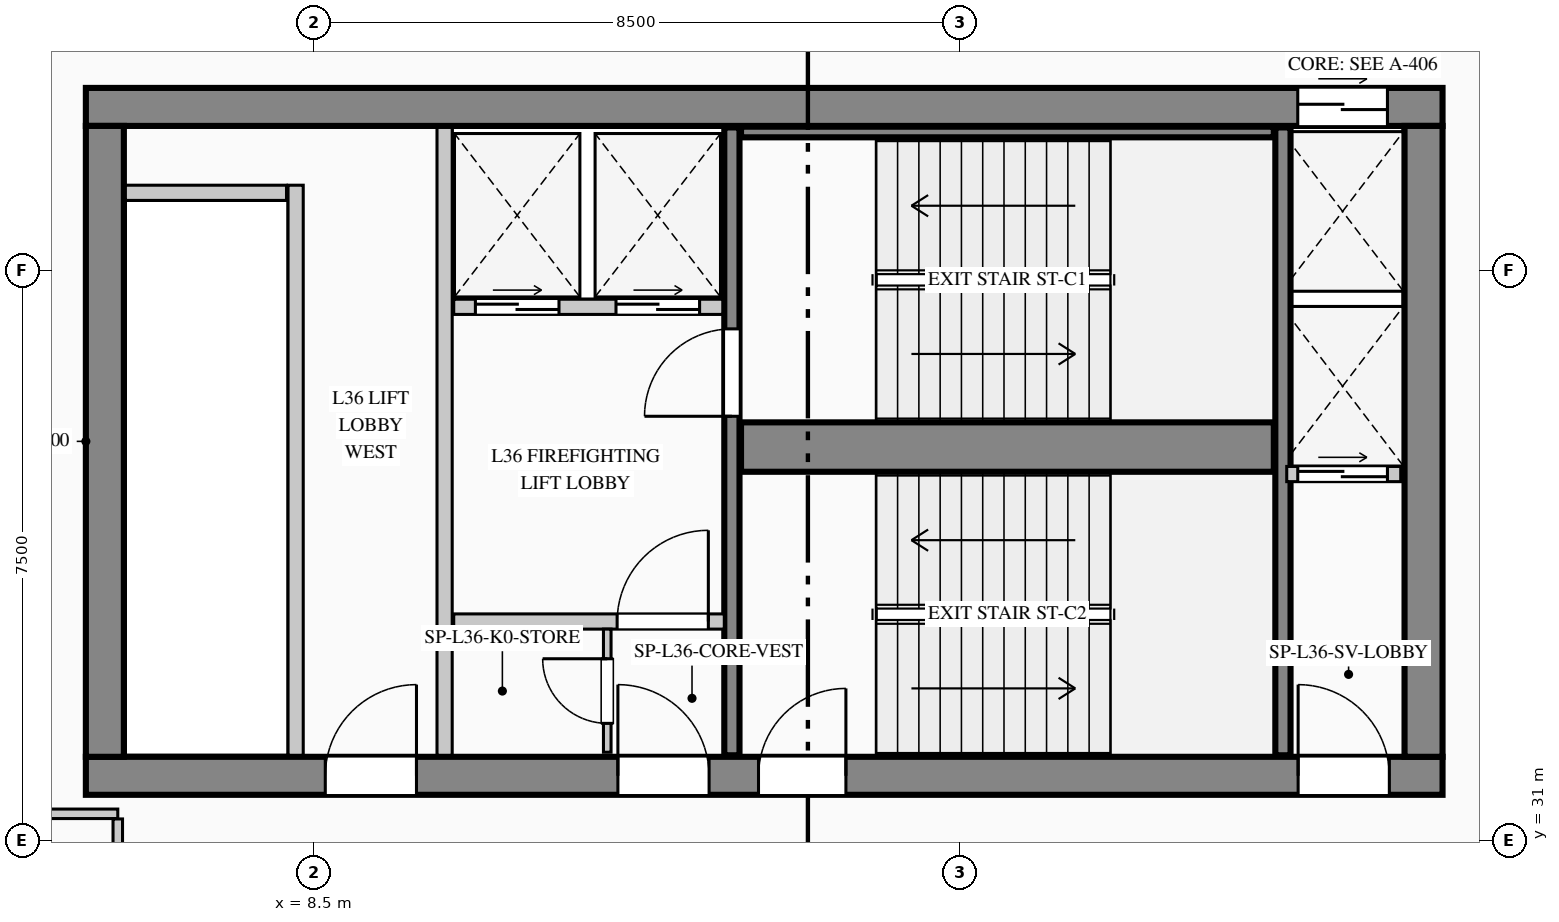
"""IFC4 building model, lengths in metres.
Left out: names, types, materials, properties, quantities, classifications, styles, units other than length and angle.
Written with IfcOpenShell. Run it as: python <this file> out.ifc"""

import sys

from ifc_helpers import new_model, si_unit, direction, frame, frame_2d, origin, place, context, subcontext, project, spatial, rectangle, extrude, element, fill, save


model = new_model("IFC4")
c1 = context("Model", 3, precision=1e-05, world=origin(), true_north=direction((0.0, 1.0)))
c2 = subcontext(c1, "Body", "Model", "MODEL_VIEW")
j1 = project(units=[si_unit("LENGTHUNIT", "METRE"), si_unit("PLANEANGLEUNIT", "RADIAN")], contexts=[c1])
p1 = place(None, origin())
s1 = spatial("IfcSite", under=j1, at=p1, CompositionType="ELEMENT")
p2 = place(p1, origin())
s2 = spatial("IfcBuilding", under=s1, at=p2, CompositionType="ELEMENT")
p3 = place(p2, frame((0.0, 0.0, 154.85)))
s3 = spatial("IfcBuildingStorey", under=s2, at=p3, CompositionType="ELEMENT", Elevation=154.85)
p4 = place(p3, frame((5.5, 40.65, 0.0), z_axis=(0.0, 0.0, 1.0), x_axis=(1.0, 0.0, 0.0)))
e1 = element("IfcWall", 1, at=p4, inside=s3, PredefinedType="SHEAR", context=c2, shape_type="SweptSolid", body=[
    extrude(rectangle(XDim=17.85, YDim=0.5, at=frame_2d((8.925, 0.0))), origin(), (0.0, 0.0, 1.0), 3.95),
])
p5 = place(p4, frame((15.945, 0.0, 0.0)))
e2 = element("IfcOpeningElement", 2, at=p5, cuts=e1, PredefinedType="OPENING", context=c2, shape_type="SweptSolid", body=[
    extrude(rectangle(XDim=1.18, YDim=2.25, at=frame_2d((0.59, 1.125))), frame((0.0, 0.26, 0.0), z_axis=(0.0, -1.0, 0.0), x_axis=(1.0, 0.0, 0.0)), (0.0, 0.0, 1.0), 0.52),
])
p6 = place(p3, frame((5.5, 31.85, 0.0), z_axis=(0.0, 0.0, 1.0), x_axis=(1.0, 0.0, 0.0)))
e3 = element("IfcWall", 3, at=p6, inside=s3, PredefinedType="SHEAR", context=c2, shape_type="SweptSolid", body=[
    extrude(rectangle(XDim=17.85, YDim=0.5, at=frame_2d((8.925, 0.0))), origin(), (0.0, 0.0, 1.0), 3.95),
])
p7 = place(p6, frame((3.15, 0.0, 0.0)))
e4 = element("IfcOpeningElement", 4, at=p7, cuts=e3, PredefinedType="OPENING", context=c2, shape_type="SweptSolid", body=[
    extrude(rectangle(XDim=1.2, YDim=2.2, at=frame_2d((0.6, 1.1))), frame((0.0, 0.26, 0.0), z_axis=(0.0, -1.0, 0.0), x_axis=(1.0, 0.0, 0.0)), (0.0, 0.0, 1.0), 0.52),
])
p8 = place(p6, frame((7.0, 0.0, 0.0)))
e5 = element("IfcOpeningElement", 5, at=p8, cuts=e3, PredefinedType="OPENING", context=c2, shape_type="SweptSolid", body=[
    extrude(rectangle(XDim=1.2, YDim=2.2, at=frame_2d((0.6, 1.1))), frame((0.0, 0.26, 0.0), z_axis=(0.0, -1.0, 0.0), x_axis=(1.0, 0.0, 0.0)), (0.0, 0.0, 1.0), 0.52),
])
p9 = place(p6, frame((8.85, 0.0, 0.0)))
e6 = element("IfcOpeningElement", 6, at=p9, cuts=e3, PredefinedType="OPENING", context=c2, shape_type="SweptSolid", body=[
    extrude(rectangle(XDim=1.15, YDim=2.2, at=frame_2d((0.575, 1.1))), frame((0.0, 0.26, 0.0), z_axis=(0.0, -1.0, 0.0), x_axis=(1.0, 0.0, 0.0)), (0.0, 0.0, 1.0), 0.52),
])
p10 = place(p6, frame((15.95, 0.0, 0.0)))
e7 = element("IfcOpeningElement", 7, at=p10, cuts=e3, PredefinedType="OPENING", context=c2, shape_type="SweptSolid", body=[
    extrude(rectangle(XDim=1.2, YDim=2.2, at=frame_2d((0.6, 1.1))), frame((0.0, 0.26, 0.0), z_axis=(0.0, -1.0, 0.0), x_axis=(1.0, 0.0, 0.0)), (0.0, 0.0, 1.0), 0.52),
])
for number, where, z_axis, x_axis in (
    (8, (5.75, 32.1, 0.0), (0.0, 0.0, 1.0), (0.0, 1.0, 0.0)),
    (9, (23.1, 32.1, 0.0), (0.0, 0.0, 1.0), (0.0, 1.0, 0.0)),
):
    element("IfcWall", number, at=place(p3, frame(where, z_axis=z_axis, x_axis=x_axis)), inside=s3, PredefinedType="SHEAR", context=c2, shape_type="SweptSolid", body=[
        extrude(rectangle(XDim=8.3, YDim=0.5, at=frame_2d((4.15, 0.0))), origin(), (0.0, 0.0, 1.0), 3.95),
    ])
p11 = place(p3, frame((14.0, 32.12, 0.0), z_axis=(0.0, 0.0, 1.0), x_axis=(0.0, 1.0, 0.0)))
e10 = element("IfcWall", 10, at=p11, inside=s3, PredefinedType="SHEAR", context=c2, shape_type="SweptSolid", body=[
    extrude(rectangle(XDim=8.26, YDim=0.2, at=frame_2d((4.13, 0.0))), origin(), (0.0, 0.0, 1.0), 3.95),
])
p12 = place(p11, frame((4.46, 0.0, 0.0)))
e11 = element("IfcOpeningElement", 11, at=p12, cuts=e10, PredefinedType="OPENING", context=c2, shape_type="SweptSolid", body=[
    extrude(rectangle(XDim=1.15, YDim=2.2, at=frame_2d((0.575, 1.1))), frame((0.0, 0.11, 0.0), z_axis=(0.0, -1.0, 0.0), x_axis=(1.0, 0.0, 0.0)), (0.0, 0.0, 1.0), 0.22),
])
p13 = place(p3, frame((14.12, 36.175, 0.0), z_axis=(0.0, 0.0, 1.0), x_axis=(1.0, 0.0, 0.0)))
e12 = element("IfcWall", 12, at=p13, inside=s3, PredefinedType="SHEAR", context=c2, shape_type="SweptSolid", body=[
    extrude(rectangle(XDim=7.01, YDim=0.65, at=frame_2d((3.505, 0.0))), origin(), (0.0, 0.0, 1.0), 3.95),
])
p14 = place(p3, frame((21.25, 32.12, 0.0), z_axis=(0.0, 0.0, 1.0), x_axis=(0.0, 1.0, 0.0)))
e13 = element("IfcWall", 13, at=p14, inside=s3, PredefinedType="SHEAR", context=c2, shape_type="SweptSolid", body=[
    extrude(rectangle(XDim=8.26, YDim=0.2, at=frame_2d((4.13, 0.0))), origin(), (0.0, 0.0, 1.0), 3.95),
])
p15 = place(p3, frame((14.12, 40.32, 0.0), z_axis=(0.0, 0.0, 1.0), x_axis=(1.0, 0.0, 0.0)))
e14 = element("IfcWall", 14, at=p15, inside=s3, PredefinedType="SHEAR", context=c2, shape_type="SweptSolid", body=[
    extrude(rectangle(XDim=7.01, YDim=0.14, at=frame_2d((3.505, 0.0))), origin(), (0.0, 0.0, 1.0), 3.95),
])
p16 = place(p3, frame((7.993, 4.73, 0.0), z_axis=(0.0, 0.0, 1.0), x_axis=(-0.136989009016, 0.990572567462, 0.0)))
e15 = element("IfcWall", 15, at=p16, inside=s3, PredefinedType="STANDARD", context=c2, shape_type="SweptSolid", body=[
    extrude(rectangle(XDim=36.888, YDim=0.26, at=frame_2d((18.444, 0.0))), origin(), (0.0, 0.0, 1.0), 3.69),
])
p17 = place(p16, frame((19.435, 0.0, 0.9)))
e16 = element("IfcOpeningElement", 16, at=p17, cuts=e15, PredefinedType="OPENING", context=c2, shape_type="SweptSolid", body=[
    extrude(rectangle(XDim=2.1, YDim=2.0, at=frame_2d((1.05, 1.0))), frame((0.0, 0.14, 0.0), z_axis=(0.0, -1.0, 0.0), x_axis=(1.0, 0.0, 0.0)), (0.0, 0.0, 1.0), 0.28),
])
p18 = place(p3, frame((8.26, 32.12, 0.0), z_axis=(0.0, 0.0, 1.0), x_axis=(0.0, 1.0, 0.0)))
e17 = element("IfcWall", 17, at=p18, inside=s3, PredefinedType="PARTITIONING", context=c2, shape_type="SweptSolid", body=[
    extrude(rectangle(XDim=7.5, YDim=0.2, at=frame_2d((3.75, 0.0))), origin(), (0.0, 0.0, 1.0), 3.69),
])
p19 = place(p3, frame((6.02, 39.52, 0.0), z_axis=(0.0, 0.0, 1.0), x_axis=(1.0, 0.0, 0.0)))
e18 = element("IfcWall", 18, at=p19, inside=s3, PredefinedType="PARTITIONING", context=c2, shape_type="SweptSolid", body=[
    extrude(rectangle(XDim=2.12, YDim=0.2, at=frame_2d((1.06, 0.0))), origin(), (0.0, 0.0, 1.0), 3.69),
])
p20 = place(p3, frame((10.22, 32.12, 0.0), z_axis=(0.0, 0.0, 1.0), x_axis=(0.0, 1.0, 0.0)))
e19 = element("IfcWall", 19, at=p20, inside=s3, PredefinedType="PARTITIONING", context=c2, shape_type="SweptSolid", body=[
    extrude(rectangle(XDim=8.26, YDim=0.2, at=frame_2d((4.13, 0.0))), origin(), (0.0, 0.0, 1.0), 3.69),
])
p21 = place(p3, frame((10.34, 38.02, 0.0), z_axis=(0.0, 0.0, 1.0), x_axis=(1.0, 0.0, 0.0)))
e20 = element("IfcWall", 20, at=p21, inside=s3, PredefinedType="PARTITIONING", context=c2, shape_type="SweptSolid", body=[
    extrude(rectangle(XDim=3.54, YDim=0.2, at=frame_2d((1.77, 0.0))), origin(), (0.0, 0.0, 1.0), 3.69),
])
p22 = place(p21, frame((0.285, 0.0, 0.0)))
e21 = element("IfcOpeningElement", 21, at=p22, cuts=e20, PredefinedType="OPENING", context=c2, shape_type="SweptSolid", body=[
    extrude(rectangle(XDim=1.1, YDim=2.2, at=frame_2d((0.55, 1.1))), frame((0.0, 0.11, 0.0), z_axis=(0.0, -1.0, 0.0), x_axis=(1.0, 0.0, 0.0)), (0.0, 0.0, 1.0), 0.22),
])
p23 = place(p21, frame((2.135, 0.0, 0.0)))
e22 = element("IfcOpeningElement", 22, at=p23, cuts=e20, PredefinedType="OPENING", context=c2, shape_type="SweptSolid", body=[
    extrude(rectangle(XDim=1.1, YDim=2.2, at=frame_2d((0.55, 1.1))), frame((0.0, 0.11, 0.0), z_axis=(0.0, -1.0, 0.0), x_axis=(1.0, 0.0, 0.0)), (0.0, 0.0, 1.0), 0.22),
])
p24 = place(p3, frame((10.34, 33.88, 0.0), z_axis=(0.0, 0.0, 1.0), x_axis=(1.0, 0.0, 0.0)))
e23 = element("IfcWall", 23, at=p24, inside=s3, PredefinedType="PARTITIONING", context=c2, shape_type="SweptSolid", body=[
    extrude(rectangle(XDim=3.56, YDim=0.2, at=frame_2d((1.78, 0.0))), origin(), (0.0, 0.0, 1.0), 3.69),
])
p25 = place(p24, frame((2.15, 0.0, 0.0)))
e24 = element("IfcOpeningElement", 24, at=p25, cuts=e23, PredefinedType="OPENING", context=c2, shape_type="SweptSolid", body=[
    extrude(rectangle(XDim=1.2, YDim=2.2, at=frame_2d((0.6, 1.1))), frame((0.0, 0.11, 0.0), z_axis=(0.0, -1.0, 0.0), x_axis=(1.0, 0.0, 0.0)), (0.0, 0.0, 1.0), 0.22),
])
p26 = place(p3, frame((12.36, 32.16, 0.0), z_axis=(0.0, 0.0, 1.0), x_axis=(0.0, 1.0, 0.0)))
e25 = element("IfcWall", 25, at=p26, inside=s3, PredefinedType="PARTITIONING", context=c2, shape_type="SweptSolid", body=[
    extrude(rectangle(XDim=1.62, YDim=0.1, at=frame_2d((0.81, 0.0))), origin(), (0.0, 0.0, 1.0), 3.69),
])
p27 = place(p26, frame((0.38, 0.0, 0.0)))
e26 = element("IfcOpeningElement", 26, at=p27, cuts=e25, PredefinedType="OPENING", context=c2, shape_type="SweptSolid", body=[
    extrude(rectangle(XDim=0.85, YDim=2.1, at=frame_2d((0.425, 1.05))), frame((0.0, 0.06, 0.0), z_axis=(0.0, -1.0, 0.0), x_axis=(1.0, 0.0, 0.0)), (0.0, 0.0, 1.0), 0.12),
])
p28 = place(p3, frame((21.3, 35.82, 0.0), z_axis=(0.0, 0.0, 1.0), x_axis=(1.0, 0.0, 0.0)))
e27 = element("IfcWall", 27, at=p28, inside=s3, PredefinedType="PARTITIONING", context=c2, shape_type="SweptSolid", body=[
    extrude(rectangle(XDim=1.5, YDim=0.2, at=frame_2d((0.75, 0.0))), origin(), (0.0, 0.0, 1.0), 3.69),
])
p29 = place(p28, frame((0.145, 0.0, 0.0)))
e28 = element("IfcOpeningElement", 28, at=p29, cuts=e27, PredefinedType="OPENING", context=c2, shape_type="SweptSolid", body=[
    extrude(rectangle(XDim=1.18, YDim=2.25, at=frame_2d((0.59, 1.125))), frame((0.0, 0.11, 0.0), z_axis=(0.0, -1.0, 0.0), x_axis=(1.0, 0.0, 0.0)), (0.0, 0.0, 1.0), 0.22),
])
p30 = place(p3, frame((4.448, 31.35, 0.0), z_axis=(0.0, 0.0, 1.0), x_axis=(1.0, 0.0, 0.0)))
e29 = element("IfcWall", 29, at=p30, inside=s3, PredefinedType="PARTITIONING", context=c2, shape_type="SweptSolid", body=[
    extrude(rectangle(XDim=1.472, YDim=0.125, at=frame_2d((0.736, 0.0))), origin(), (0.0, 0.0, 1.0), 3.69),
])
p31 = place(p3, frame((5.92, 31.282, 0.0), z_axis=(0.0, 0.0, 1.0), x_axis=(0.0, -1.0, 0.0)))
e30 = element("IfcWall", 30, at=p31, inside=s3, PredefinedType="PARTITIONING", context=c2, shape_type="SweptSolid", body=[
    extrude(rectangle(XDim=2.682, YDim=0.125, at=frame_2d((1.341, 0.0))), origin(), (0.0, 0.0, 1.0), 3.69),
])
p32 = place(p7, origin())
e31 = element("IfcDoor", 31, at=p32, inside=s3, OperationType="SINGLE_SWING_RIGHT", PredefinedType="DOOR", context=c2, shape_type="SweptSolid", body=[
    extrude(rectangle(XDim=1.2, YDim=2.2, at=frame_2d((0.6, 1.1))), frame((0.0, 0.025, 0.0), z_axis=(0.0, -1.0, 0.0), x_axis=(1.0, 0.0, 0.0)), (0.0, 0.0, 1.0), 0.05),
])
fill(e4, e31)
p33 = place(p8, origin())
e32 = element("IfcDoor", 32, at=p33, inside=s3, OperationType="SINGLE_SWING_LEFT", PredefinedType="DOOR", context=c2, shape_type="SweptSolid", body=[
    extrude(rectangle(XDim=1.2, YDim=2.2, at=frame_2d((0.6, 1.1))), frame((0.0, 0.025, 0.0), z_axis=(0.0, -1.0, 0.0), x_axis=(1.0, 0.0, 0.0)), (0.0, 0.0, 1.0), 0.05),
])
fill(e5, e32)
p34 = place(p9, origin())
e33 = element("IfcDoor", 33, at=p34, inside=s3, OperationType="SINGLE_SWING_RIGHT", PredefinedType="DOOR", context=c2, shape_type="SweptSolid", body=[
    extrude(rectangle(XDim=1.15, YDim=2.2, at=frame_2d((0.575, 1.1))), frame((0.0, 0.025, 0.0), z_axis=(0.0, -1.0, 0.0), x_axis=(1.0, 0.0, 0.0)), (0.0, 0.0, 1.0), 0.05),
])
fill(e6, e33)
p35 = place(p10, origin())
e34 = element("IfcDoor", 34, at=p35, inside=s3, OperationType="SINGLE_SWING_LEFT", PredefinedType="DOOR", context=c2, shape_type="SweptSolid", body=[
    extrude(rectangle(XDim=1.2, YDim=2.2, at=frame_2d((0.6, 1.1))), frame((0.0, 0.025, 0.0), z_axis=(0.0, -1.0, 0.0), x_axis=(1.0, 0.0, 0.0)), (0.0, 0.0, 1.0), 0.05),
])
fill(e7, e34)
p36 = place(p25, origin())
e35 = element("IfcDoor", 35, at=p36, inside=s3, OperationType="SINGLE_SWING_RIGHT", PredefinedType="DOOR", context=c2, shape_type="SweptSolid", body=[
    extrude(rectangle(XDim=1.2, YDim=2.2, at=frame_2d((0.6, 1.1))), frame((0.0, 0.025, 0.0), z_axis=(0.0, -1.0, 0.0), x_axis=(1.0, 0.0, 0.0)), (0.0, 0.0, 1.0), 0.05),
])
fill(e24, e35)
p37 = place(p27, origin())
e36 = element("IfcDoor", 36, at=p37, inside=s3, OperationType="SINGLE_SWING_RIGHT", PredefinedType="DOOR", context=c2, shape_type="SweptSolid", body=[
    extrude(rectangle(XDim=0.85, YDim=2.1, at=frame_2d((0.425, 1.05))), frame((0.0, 0.025, 0.0), z_axis=(0.0, -1.0, 0.0), x_axis=(1.0, 0.0, 0.0)), (0.0, 0.0, 1.0), 0.05),
])
fill(e26, e36)
p38 = place(p12, origin())
e37 = element("IfcDoor", 37, at=p38, inside=s3, OperationType="SINGLE_SWING_LEFT", PredefinedType="DOOR", context=c2, shape_type="SweptSolid", body=[
    extrude(rectangle(XDim=1.15, YDim=2.2, at=frame_2d((0.575, 1.1))), frame((0.0, 0.025, 0.0), z_axis=(0.0, -1.0, 0.0), x_axis=(1.0, 0.0, 0.0)), (0.0, 0.0, 1.0), 0.05),
])
fill(e11, e37)
p39 = place(p22, origin())
e38 = element("IfcDoor", 38, at=p39, inside=s3, OperationType="DOUBLE_DOOR_SLIDING", PredefinedType="DOOR", context=c2, shape_type="SweptSolid", body=[
    extrude(rectangle(XDim=1.1, YDim=2.2, at=frame_2d((0.55, 1.1))), frame((0.0, 0.025, 0.0), z_axis=(0.0, -1.0, 0.0), x_axis=(1.0, 0.0, 0.0)), (0.0, 0.0, 1.0), 0.05),
])
fill(e21, e38)
p40 = place(p23, origin())
e39 = element("IfcDoor", 39, at=p40, inside=s3, OperationType="DOUBLE_DOOR_SLIDING", PredefinedType="DOOR", context=c2, shape_type="SweptSolid", body=[
    extrude(rectangle(XDim=1.1, YDim=2.2, at=frame_2d((0.55, 1.1))), frame((0.0, 0.025, 0.0), z_axis=(0.0, -1.0, 0.0), x_axis=(1.0, 0.0, 0.0)), (0.0, 0.0, 1.0), 0.05),
])
fill(e22, e39)
p41 = place(p5, origin())
e40 = element("IfcDoor", 40, at=p41, inside=s3, OperationType="DOUBLE_DOOR_SLIDING", PredefinedType="DOOR", context=c2, shape_type="SweptSolid", body=[
    extrude(rectangle(XDim=1.18, YDim=2.25, at=frame_2d((0.59, 1.125))), frame((0.0, 0.025, 0.0), z_axis=(0.0, -1.0, 0.0), x_axis=(1.0, 0.0, 0.0)), (0.0, 0.0, 1.0), 0.05),
])
fill(e2, e40)
p42 = place(p29, origin())
e41 = element("IfcDoor", 41, at=p42, inside=s3, OperationType="DOUBLE_DOOR_SLIDING", PredefinedType="DOOR", context=c2, shape_type="SweptSolid", body=[
    extrude(rectangle(XDim=1.18, YDim=2.25, at=frame_2d((0.59, 1.125))), frame((0.0, 0.025, 0.0), z_axis=(0.0, -1.0, 0.0), x_axis=(1.0, 0.0, 0.0)), (0.0, 0.0, 1.0), 0.05),
])
fill(e28, e41)
save(model, sys.argv[1])
